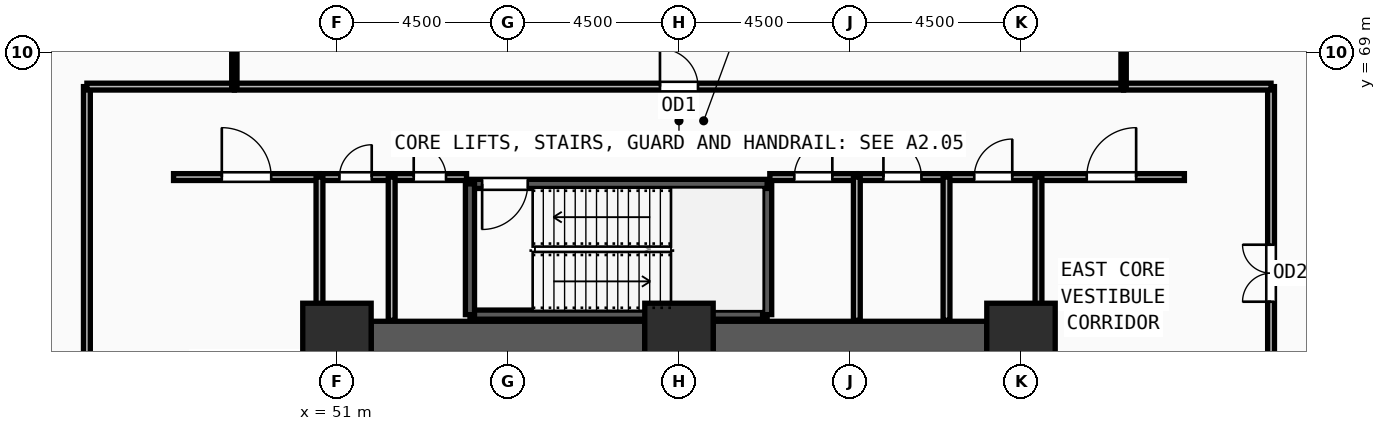
"""IFC4 building model, lengths in metres.
Left out: names, types, materials, properties, quantities, classifications, styles, units other than length and angle.
Written with IfcOpenShell. Run it as: python <this file> out.ifc"""

import sys

from ifc_helpers import new_model, si_unit, direction, frame, frame_2d, origin, origin_2d, place, context, subcontext, project, spatial, rectangle, extrude, source, transform, mapped, element, fill, save


model = new_model("IFC4")
c1 = context("Model", 3, precision=1e-05, world=origin(), true_north=direction((0.0, 1.0)))
c2 = subcontext(c1, "Body", "Model", "MODEL_VIEW")
j1 = project(units=[si_unit("LENGTHUNIT", "METRE"), si_unit("PLANEANGLEUNIT", "RADIAN")], contexts=[c1])
p1 = place(None, origin())
s1 = spatial("IfcSite", under=j1, at=p1, CompositionType="ELEMENT")
p2 = place(p1, origin())
s2 = spatial("IfcBuilding", under=s1, at=p2, CompositionType="ELEMENT")
p3 = place(p2, frame((0.0, 0.0, 14.4)))
s3 = spatial("IfcBuildingStorey", under=s2, at=p3, CompositionType="ELEMENT", Elevation=14.4)
m1 = source(origin(), c2, "Body", "SweptSolid", [
    extrude(rectangle(XDim=1.8, YDim=1.8, at=origin_2d()), origin(), (0.0, 0.0, 1.0), 4.5),
])
for number, where, z_axis, x_axis in (
    (1, (69.0, 61.5, 0.0), (0.0, 0.0, 1.0), (1.0, 0.0, 0.0)),
    (2, (60.0, 61.5, 0.0), (0.0, 0.0, 1.0), (1.0, 0.0, 0.0)),
    (3, (51.0, 61.5, 0.0), (0.0, 0.0, 1.0), (1.0, 0.0, 0.0)),
):
    element("IfcColumn", number, at=place(p3, frame(where, z_axis=z_axis, x_axis=x_axis)), inside=s3, PredefinedType="COLUMN", context=c2, shape_type="MappedRepresentation", body=[
        mapped(m1, transform((0.0, 0.0, 0.0), x_axis=(1.0, 0.0, 0.0), y_axis=(0.0, 1.0, 0.0), z_axis=(0.0, 0.0, 1.0), scale=1.0)),
    ])
for number, where, z_axis, x_axis in (
    (4, (51.9, 61.5, 0.0), (0.0, 0.0, 1.0), (1.0, 0.0, 0.0)),
    (5, (60.9, 61.5, 0.0), (0.0, 0.0, 1.0), (1.0, 0.0, 0.0)),
):
    element("IfcWall", number, at=place(p3, frame(where, z_axis=z_axis, x_axis=x_axis)), inside=s3, PredefinedType="SHEAR", context=c2, shape_type="SweptSolid", body=[
        extrude(rectangle(XDim=7.2, YDim=0.85, at=frame_2d((3.6, 0.0))), origin(), (0.0, 0.0, 1.0), 4.25),
    ])
p4 = place(p3, frame((54.5, 62.1, 0.0), z_axis=(0.0, 0.0, 1.0), x_axis=(1.0, 0.0, 0.0)))
e6 = element("IfcWall", 6, at=p4, inside=s3, PredefinedType="SOLIDWALL", context=c2, shape_type="SweptSolid", body=[
    extrude(rectangle(XDim=7.82, YDim=0.24, at=frame_2d((3.91, 0.0))), origin(), (0.0, 0.0, 1.0), 4.25),
])
p5 = place(p3, frame((62.32, 62.1, 0.0), z_axis=(0.0, 0.0, 1.0), x_axis=(0.0, 1.0, 0.0)))
e7 = element("IfcWall", 7, at=p5, inside=s3, PredefinedType="SOLIDWALL", context=c2, shape_type="SweptSolid", body=[
    extrude(rectangle(XDim=3.44, YDim=0.24, at=frame_2d((1.72, 0.0))), origin(), (0.0, 0.0, 1.0), 4.25),
])
p6 = place(p3, frame((62.32, 65.54, 0.0), z_axis=(0.0, 0.0, 1.0), x_axis=(-1.0, 0.0, 0.0)))
e8 = element("IfcWall", 8, at=p6, inside=s3, PredefinedType="SOLIDWALL", context=c2, shape_type="SweptSolid", body=[
    extrude(rectangle(XDim=7.82, YDim=0.24, at=frame_2d((3.91, 0.0))), origin(), (0.0, 0.0, 1.0), 4.25),
])
m2 = source(origin(), c2, "Body", "SweptSolid", [
    extrude(rectangle(XDim=1.2, YDim=2.2, at=frame_2d((0.6, 1.1))), frame((0.0, 0.13, 0.0), z_axis=(0.0, -1.0, 0.0), x_axis=(1.0, 0.0, 0.0)), (0.0, 0.0, 1.0), 0.26),
])
p7 = place(p6, frame((6.3, 0.0, 0.0)))
e9 = element("IfcOpeningElement", 9, at=p7, cuts=e8, PredefinedType="OPENING", context=c2, shape_type="MappedRepresentation", body=[
    mapped(m2, transform((0.0, 0.0, 0.0), x_axis=(1.0, 0.0, 0.0), y_axis=(0.0, 1.0, 0.0), z_axis=(0.0, 0.0, 1.0), scale=1.0)),
])
p8 = place(p3, frame((54.5, 65.54, 0.0), z_axis=(0.0, 0.0, 1.0), x_axis=(0.0, -1.0, 0.0)))
e10 = element("IfcWall", 10, at=p8, inside=s3, PredefinedType="SOLIDWALL", context=c2, shape_type="SweptSolid", body=[
    extrude(rectangle(XDim=3.44, YDim=0.24, at=frame_2d((1.72, 0.0))), origin(), (0.0, 0.0, 1.0), 4.25),
])
p9 = place(p3, frame((50.54, 65.72, 0.0), z_axis=(0.0, 0.0, 1.0), x_axis=(1.0, 0.0, 0.0)))
e11 = element("IfcWall", 11, at=p9, inside=s3, PredefinedType="PARTITIONING", context=c2, shape_type="SweptSolid", body=[
    extrude(rectangle(XDim=1.9, YDim=0.18, at=frame_2d((0.95, 0.0))), origin(), (0.0, 0.0, 1.0), 4.25),
])
m3 = source(origin(), c2, "Body", "SweptSolid", [
    extrude(rectangle(XDim=0.85, YDim=2.1, at=frame_2d((0.425, 1.05))), frame((0.0, 0.1, 0.0), z_axis=(0.0, -1.0, 0.0), x_axis=(1.0, 0.0, 0.0)), (0.0, 0.0, 1.0), 0.2),
])
p10 = place(p9, frame((0.525, 0.0, 0.0)))
e12 = element("IfcOpeningElement", 12, at=p10, cuts=e11, PredefinedType="OPENING", context=c2, shape_type="MappedRepresentation", body=[
    mapped(m3, transform((0.0, 0.0, 0.0), x_axis=(1.0, 0.0, 0.0), y_axis=(0.0, 1.0, 0.0), z_axis=(0.0, 0.0, 1.0), scale=1.0)),
])
p11 = place(p3, frame((52.48, 65.72, 0.0), z_axis=(0.0, 0.0, 1.0), x_axis=(1.0, 0.0, 0.0)))
e13 = element("IfcWall", 13, at=p11, inside=s3, PredefinedType="PARTITIONING", context=c2, shape_type="SweptSolid", body=[
    extrude(rectangle(XDim=1.93, YDim=0.18, at=frame_2d((0.965, 0.0))), origin(), (0.0, 0.0, 1.0), 4.25),
])
p12 = place(p11, frame((0.54, 0.0, 0.0)))
e14 = element("IfcOpeningElement", 14, at=p12, cuts=e13, PredefinedType="OPENING", context=c2, shape_type="MappedRepresentation", body=[
    mapped(m3, transform((0.0, 0.0, 0.0), x_axis=(1.0, 0.0, 0.0), y_axis=(0.0, 1.0, 0.0), z_axis=(0.0, 0.0, 1.0), scale=1.0)),
])
p13 = place(p3, frame((62.39, 65.72, 0.0), z_axis=(0.0, 0.0, 1.0), x_axis=(1.0, 0.0, 0.0)))
e15 = element("IfcWall", 15, at=p13, inside=s3, PredefinedType="PARTITIONING", context=c2, shape_type="SweptSolid", body=[
    extrude(rectangle(XDim=2.29, YDim=0.18, at=frame_2d((1.145, 0.0))), origin(), (0.0, 0.0, 1.0), 4.25),
])
m4 = source(origin(), c2, "Body", "SweptSolid", [
    extrude(rectangle(XDim=1.0, YDim=2.2, at=frame_2d((0.5, 1.1))), frame((0.0, 0.1, 0.0), z_axis=(0.0, -1.0, 0.0), x_axis=(1.0, 0.0, 0.0)), (0.0, 0.0, 1.0), 0.2),
])
p14 = place(p13, frame((0.645, 0.0, 0.0)))
e16 = element("IfcOpeningElement", 16, at=p14, cuts=e15, PredefinedType="OPENING", context=c2, shape_type="MappedRepresentation", body=[
    mapped(m4, transform((0.0, 0.0, 0.0), x_axis=(1.0, 0.0, 0.0), y_axis=(0.0, 1.0, 0.0), z_axis=(0.0, 0.0, 1.0), scale=1.0)),
])
p15 = place(p3, frame((64.72, 65.72, 0.0), z_axis=(0.0, 0.0, 1.0), x_axis=(1.0, 0.0, 0.0)))
e17 = element("IfcWall", 17, at=p15, inside=s3, PredefinedType="PARTITIONING", context=c2, shape_type="SweptSolid", body=[
    extrude(rectangle(XDim=2.32, YDim=0.18, at=frame_2d((1.16, 0.0))), origin(), (0.0, 0.0, 1.0), 4.25),
])
p16 = place(p15, frame((0.66, 0.0, 0.0)))
e18 = element("IfcOpeningElement", 18, at=p16, cuts=e17, PredefinedType="OPENING", context=c2, shape_type="MappedRepresentation", body=[
    mapped(m4, transform((0.0, 0.0, 0.0), x_axis=(1.0, 0.0, 0.0), y_axis=(0.0, 1.0, 0.0), z_axis=(0.0, 0.0, 1.0), scale=1.0)),
])
p17 = place(p3, frame((67.08, 65.72, 0.0), z_axis=(0.0, 0.0, 1.0), x_axis=(1.0, 0.0, 0.0)))
e19 = element("IfcWall", 19, at=p17, inside=s3, PredefinedType="PARTITIONING", context=c2, shape_type="SweptSolid", body=[
    extrude(rectangle(XDim=2.38, YDim=0.18, at=frame_2d((1.19, 0.0))), origin(), (0.0, 0.0, 1.0), 4.25),
])
p18 = place(p17, frame((0.69, 0.0, 0.0)))
e20 = element("IfcOpeningElement", 20, at=p18, cuts=e19, PredefinedType="OPENING", context=c2, shape_type="MappedRepresentation", body=[
    mapped(m4, transform((0.0, 0.0, 0.0), x_axis=(1.0, 0.0, 0.0), y_axis=(0.0, 1.0, 0.0), z_axis=(0.0, 0.0, 1.0), scale=1.0)),
])
p19 = place(p3, frame((46.7, 65.72, 0.0), z_axis=(0.0, 0.0, 1.0), x_axis=(1.0, 0.0, 0.0)))
e21 = element("IfcWall", 21, at=p19, inside=s3, PredefinedType="PARTITIONING", context=c2, shape_type="SweptSolid", body=[
    extrude(rectangle(XDim=3.84, YDim=0.18, at=frame_2d((1.92, 0.0))), origin(), (0.0, 0.0, 1.0), 4.25),
])
m5 = source(origin(), c2, "Body", "SweptSolid", [
    extrude(rectangle(XDim=1.3, YDim=2.2, at=frame_2d((0.65, 1.1))), frame((0.0, 0.1, 0.0), z_axis=(0.0, -1.0, 0.0), x_axis=(1.0, 0.0, 0.0)), (0.0, 0.0, 1.0), 0.2),
])
p20 = place(p19, frame((1.27, 0.0, 0.0)))
e22 = element("IfcOpeningElement", 22, at=p20, cuts=e21, PredefinedType="OPENING", context=c2, shape_type="MappedRepresentation", body=[
    mapped(m5, transform((0.0, 0.0, 0.0), x_axis=(1.0, 0.0, 0.0), y_axis=(0.0, 1.0, 0.0), z_axis=(0.0, 0.0, 1.0), scale=1.0)),
])
p21 = place(p3, frame((69.46, 65.72, 0.0), z_axis=(0.0, 0.0, 1.0), x_axis=(1.0, 0.0, 0.0)))
e23 = element("IfcWall", 23, at=p21, inside=s3, PredefinedType="PARTITIONING", context=c2, shape_type="SweptSolid", body=[
    extrude(rectangle(XDim=3.84, YDim=0.18, at=frame_2d((1.92, 0.0))), origin(), (0.0, 0.0, 1.0), 4.25),
])
p22 = place(p21, frame((1.27, 0.0, 0.0)))
e24 = element("IfcOpeningElement", 24, at=p22, cuts=e23, PredefinedType="OPENING", context=c2, shape_type="MappedRepresentation", body=[
    mapped(m5, transform((0.0, 0.0, 0.0), x_axis=(1.0, 0.0, 0.0), y_axis=(0.0, 1.0, 0.0), z_axis=(0.0, 0.0, 1.0), scale=1.0)),
])
p23 = place(p3, frame((44.42, 46.1, 0.0), z_axis=(0.0, 0.0, 1.0), x_axis=(0.0, 1.0, 0.0)))
e25 = element("IfcWall", 25, at=p23, inside=s3, PredefinedType="PARTITIONING", context=c2, shape_type="SweptSolid", body=[
    extrude(rectangle(XDim=22.0, YDim=0.18, at=frame_2d((11.0, 0.0))), origin(), (0.0, 0.0, 1.0), 4.25),
])
m6 = source(origin(), c2, "Body", "SweptSolid", [
    extrude(rectangle(XDim=1.5, YDim=2.2, at=frame_2d((0.75, 1.1))), frame((0.0, 0.1, 0.0), z_axis=(0.0, -1.0, 0.0), x_axis=(1.0, 0.0, 0.0)), (0.0, 0.0, 1.0), 0.2),
])
p24 = place(p23, frame((10.25, 0.0, 0.0)))
e26 = element("IfcOpeningElement", 26, at=p24, cuts=e25, PredefinedType="OPENING", context=c2, shape_type="MappedRepresentation", body=[
    mapped(m6, transform((0.0, 0.0, 0.0), x_axis=(1.0, 0.0, 0.0), y_axis=(0.0, 1.0, 0.0), z_axis=(0.0, 0.0, 1.0), scale=1.0)),
])
p25 = place(p3, frame((75.58, 58.28, 0.0), z_axis=(0.0, 0.0, 1.0), x_axis=(0.0, 1.0, 0.0)))
e27 = element("IfcWall", 27, at=p25, inside=s3, PredefinedType="PARTITIONING", context=c2, shape_type="SweptSolid", body=[
    extrude(rectangle(XDim=9.82, YDim=0.18, at=frame_2d((4.91, 0.0))), origin(), (0.0, 0.0, 1.0), 4.25),
])
p26 = place(p25, frame((4.16, 0.0, 0.0)))
e28 = element("IfcOpeningElement", 28, at=p26, cuts=e27, PredefinedType="OPENING", context=c2, shape_type="MappedRepresentation", body=[
    mapped(m6, transform((0.0, 0.0, 0.0), x_axis=(1.0, 0.0, 0.0), y_axis=(0.0, 1.0, 0.0), z_axis=(0.0, 0.0, 1.0), scale=1.0)),
])
p27 = place(p3, frame((48.3, 68.1, 0.0), z_axis=(0.0, 0.0, 1.0), x_axis=(1.0, 0.0, 0.0)))
e29 = element("IfcWall", 29, at=p27, inside=s3, PredefinedType="PARTITIONING", context=c2, shape_type="SweptSolid", body=[
    extrude(rectangle(XDim=23.4, YDim=0.18, at=frame_2d((11.7, 0.0))), origin(), (0.0, 0.0, 1.0), 4.25),
])
p28 = place(p27, frame((11.2, 0.0, 0.0)))
e30 = element("IfcOpeningElement", 30, at=p28, cuts=e29, PredefinedType="OPENING", context=c2, shape_type="MappedRepresentation", body=[
    mapped(m4, transform((0.0, 0.0, 0.0), x_axis=(1.0, 0.0, 0.0), y_axis=(0.0, 1.0, 0.0), z_axis=(0.0, 0.0, 1.0), scale=1.0)),
])
for number, where, z_axis, x_axis in (
    (31, (44.42, 68.1, 0.0), (0.0, 0.0, 1.0), (1.0, 0.0, 0.0)),
    (32, (71.7, 68.1, 0.0), (0.0, 0.0, 1.0), (1.0, 0.0, 0.0)),
):
    element("IfcWall", number, at=place(p3, frame(where, z_axis=z_axis, x_axis=x_axis)), inside=s3, PredefinedType="PARTITIONING", context=c2, shape_type="SweptSolid", body=[
        extrude(rectangle(XDim=3.88, YDim=0.18, at=frame_2d((1.94, 0.0))), origin(), (0.0, 0.0, 1.0), 4.25),
    ])
for number, where, z_axis, x_axis in (
    (33, (48.3, 68.1, 0.0), (0.0, 0.0, 1.0), (0.0, 1.0, 0.0)),
    (34, (71.7, 68.1, 0.0), (0.0, 0.0, 1.0), (0.0, 1.0, 0.0)),
):
    element("IfcWall", number, at=place(p3, frame(where, z_axis=z_axis, x_axis=x_axis)), inside=s3, PredefinedType="PARTITIONING", context=c2, shape_type="SweptSolid", body=[
        extrude(rectangle(XDim=18.675, YDim=0.14, at=frame_2d((9.337, 0.0))), origin(), (0.0, 0.0, 1.0), 4.25),
    ])
for number, where, z_axis, x_axis in (
    (35, (50.54, 61.95, 0.0), (0.0, 0.0, 1.0), (0.0, 1.0, 0.0)),
    (36, (52.44, 61.95, 0.0), (0.0, 0.0, 1.0), (0.0, 1.0, 0.0)),
    (37, (64.68, 61.95, 0.0), (0.0, 0.0, 1.0), (0.0, 1.0, 0.0)),
    (38, (67.04, 61.95, 0.0), (0.0, 0.0, 1.0), (0.0, 1.0, 0.0)),
    (39, (69.46, 61.95, 0.0), (0.0, 0.0, 1.0), (0.0, 1.0, 0.0)),
):
    element("IfcWall", number, at=place(p3, frame(where, z_axis=z_axis, x_axis=x_axis)), inside=s3, PredefinedType="PARTITIONING", context=c2, shape_type="SweptSolid", body=[
        extrude(rectangle(XDim=3.77, YDim=0.18, at=frame_2d((1.885, 0.0))), origin(), (0.0, 0.0, 1.0), 4.25),
    ])
m7 = source(origin(), c2, "Body", "SweptSolid", [
    extrude(rectangle(XDim=1.2, YDim=2.2, at=frame_2d((0.6, 1.1))), frame((0.0, 0.025, 0.0), z_axis=(0.0, -1.0, 0.0), x_axis=(1.0, 0.0, 0.0)), (0.0, 0.0, 1.0), 0.05),
])
p29 = place(p7, origin())
e40 = element("IfcDoor", 40, at=p29, inside=s3, OperationType="SINGLE_SWING_RIGHT", PredefinedType="DOOR", context=c2, shape_type="MappedRepresentation", body=[
    mapped(m7, transform((0.0, 0.0, 0.0), x_axis=(1.0, 0.0, 0.0), y_axis=(0.0, 1.0, 0.0), z_axis=(0.0, 0.0, 1.0), scale=1.0)),
])
fill(e9, e40)
m8 = source(origin(), c2, "Body", "SweptSolid", [
    extrude(rectangle(XDim=0.85, YDim=2.1, at=frame_2d((0.425, 1.05))), frame((0.0, 0.025, 0.0), z_axis=(0.0, -1.0, 0.0), x_axis=(1.0, 0.0, 0.0)), (0.0, 0.0, 1.0), 0.05),
])
p30 = place(p10, origin())
e41 = element("IfcDoor", 41, at=p30, inside=s3, OperationType="SINGLE_SWING_RIGHT", PredefinedType="DOOR", context=c2, shape_type="MappedRepresentation", body=[
    mapped(m8, transform((0.0, 0.0, 0.0), x_axis=(1.0, 0.0, 0.0), y_axis=(0.0, 1.0, 0.0), z_axis=(0.0, 0.0, 1.0), scale=1.0)),
])
fill(e12, e41)
p31 = place(p12, origin())
e42 = element("IfcDoor", 42, at=p31, inside=s3, OperationType="SINGLE_SWING_LEFT", PredefinedType="DOOR", context=c2, shape_type="MappedRepresentation", body=[
    mapped(m8, transform((0.0, 0.0, 0.0), x_axis=(1.0, 0.0, 0.0), y_axis=(0.0, 1.0, 0.0), z_axis=(0.0, 0.0, 1.0), scale=1.0)),
])
fill(e14, e42)
m9 = source(origin(), c2, "Body", "SweptSolid", [
    extrude(rectangle(XDim=1.0, YDim=2.2, at=frame_2d((0.5, 1.1))), frame((0.0, 0.025, 0.0), z_axis=(0.0, -1.0, 0.0), x_axis=(1.0, 0.0, 0.0)), (0.0, 0.0, 1.0), 0.05),
])
p32 = place(p14, origin())
e43 = element("IfcDoor", 43, at=p32, inside=s3, OperationType="SINGLE_SWING_RIGHT", PredefinedType="DOOR", context=c2, shape_type="MappedRepresentation", body=[
    mapped(m9, transform((0.0, 0.0, 0.0), x_axis=(1.0, 0.0, 0.0), y_axis=(0.0, 1.0, 0.0), z_axis=(0.0, 0.0, 1.0), scale=1.0)),
])
fill(e16, e43)
p33 = place(p16, origin())
e44 = element("IfcDoor", 44, at=p33, inside=s3, OperationType="SINGLE_SWING_LEFT", PredefinedType="DOOR", context=c2, shape_type="MappedRepresentation", body=[
    mapped(m9, transform((0.0, 0.0, 0.0), x_axis=(1.0, 0.0, 0.0), y_axis=(0.0, 1.0, 0.0), z_axis=(0.0, 0.0, 1.0), scale=1.0)),
])
fill(e18, e44)
p34 = place(p18, origin())
e45 = element("IfcDoor", 45, at=p34, inside=s3, OperationType="SINGLE_SWING_RIGHT", PredefinedType="DOOR", context=c2, shape_type="MappedRepresentation", body=[
    mapped(m9, transform((0.0, 0.0, 0.0), x_axis=(1.0, 0.0, 0.0), y_axis=(0.0, 1.0, 0.0), z_axis=(0.0, 0.0, 1.0), scale=1.0)),
])
fill(e20, e45)
m10 = source(origin(), c2, "Body", "SweptSolid", [
    extrude(rectangle(XDim=1.3, YDim=2.2, at=frame_2d((0.65, 1.1))), frame((0.0, 0.025, 0.0), z_axis=(0.0, -1.0, 0.0), x_axis=(1.0, 0.0, 0.0)), (0.0, 0.0, 1.0), 0.05),
])
p35 = place(p20, origin())
e46 = element("IfcDoor", 46, at=p35, inside=s3, OperationType="SINGLE_SWING_LEFT", PredefinedType="DOOR", context=c2, shape_type="MappedRepresentation", body=[
    mapped(m10, transform((0.0, 0.0, 0.0), x_axis=(1.0, 0.0, 0.0), y_axis=(0.0, 1.0, 0.0), z_axis=(0.0, 0.0, 1.0), scale=1.0)),
])
fill(e22, e46)
p36 = place(p22, origin())
e47 = element("IfcDoor", 47, at=p36, inside=s3, OperationType="SINGLE_SWING_RIGHT", PredefinedType="DOOR", context=c2, shape_type="MappedRepresentation", body=[
    mapped(m10, transform((0.0, 0.0, 0.0), x_axis=(1.0, 0.0, 0.0), y_axis=(0.0, 1.0, 0.0), z_axis=(0.0, 0.0, 1.0), scale=1.0)),
])
fill(e24, e47)
m11 = source(origin(), c2, "Body", "SweptSolid", [
    extrude(rectangle(XDim=1.5, YDim=2.2, at=frame_2d((0.75, 1.1))), frame((0.0, 0.025, 0.0), z_axis=(0.0, -1.0, 0.0), x_axis=(1.0, 0.0, 0.0)), (0.0, 0.0, 1.0), 0.05),
])
p37 = place(p26, origin())
e48 = element("IfcDoor", 48, at=p37, inside=s3, OperationType="DOUBLE_DOOR_SINGLE_SWING", PredefinedType="DOOR", context=c2, shape_type="MappedRepresentation", body=[
    mapped(m11, transform((0.0, 0.0, 0.0), x_axis=(1.0, 0.0, 0.0), y_axis=(0.0, 1.0, 0.0), z_axis=(0.0, 0.0, 1.0), scale=1.0)),
])
fill(e28, e48)
p38 = place(p28, origin())
e49 = element("IfcDoor", 49, at=p38, inside=s3, OperationType="SINGLE_SWING_LEFT", PredefinedType="DOOR", context=c2, shape_type="MappedRepresentation", body=[
    mapped(m9, transform((0.0, 0.0, 0.0), x_axis=(1.0, 0.0, 0.0), y_axis=(0.0, 1.0, 0.0), z_axis=(0.0, 0.0, 1.0), scale=1.0)),
])
fill(e30, e49)
save(model, sys.argv[1])
